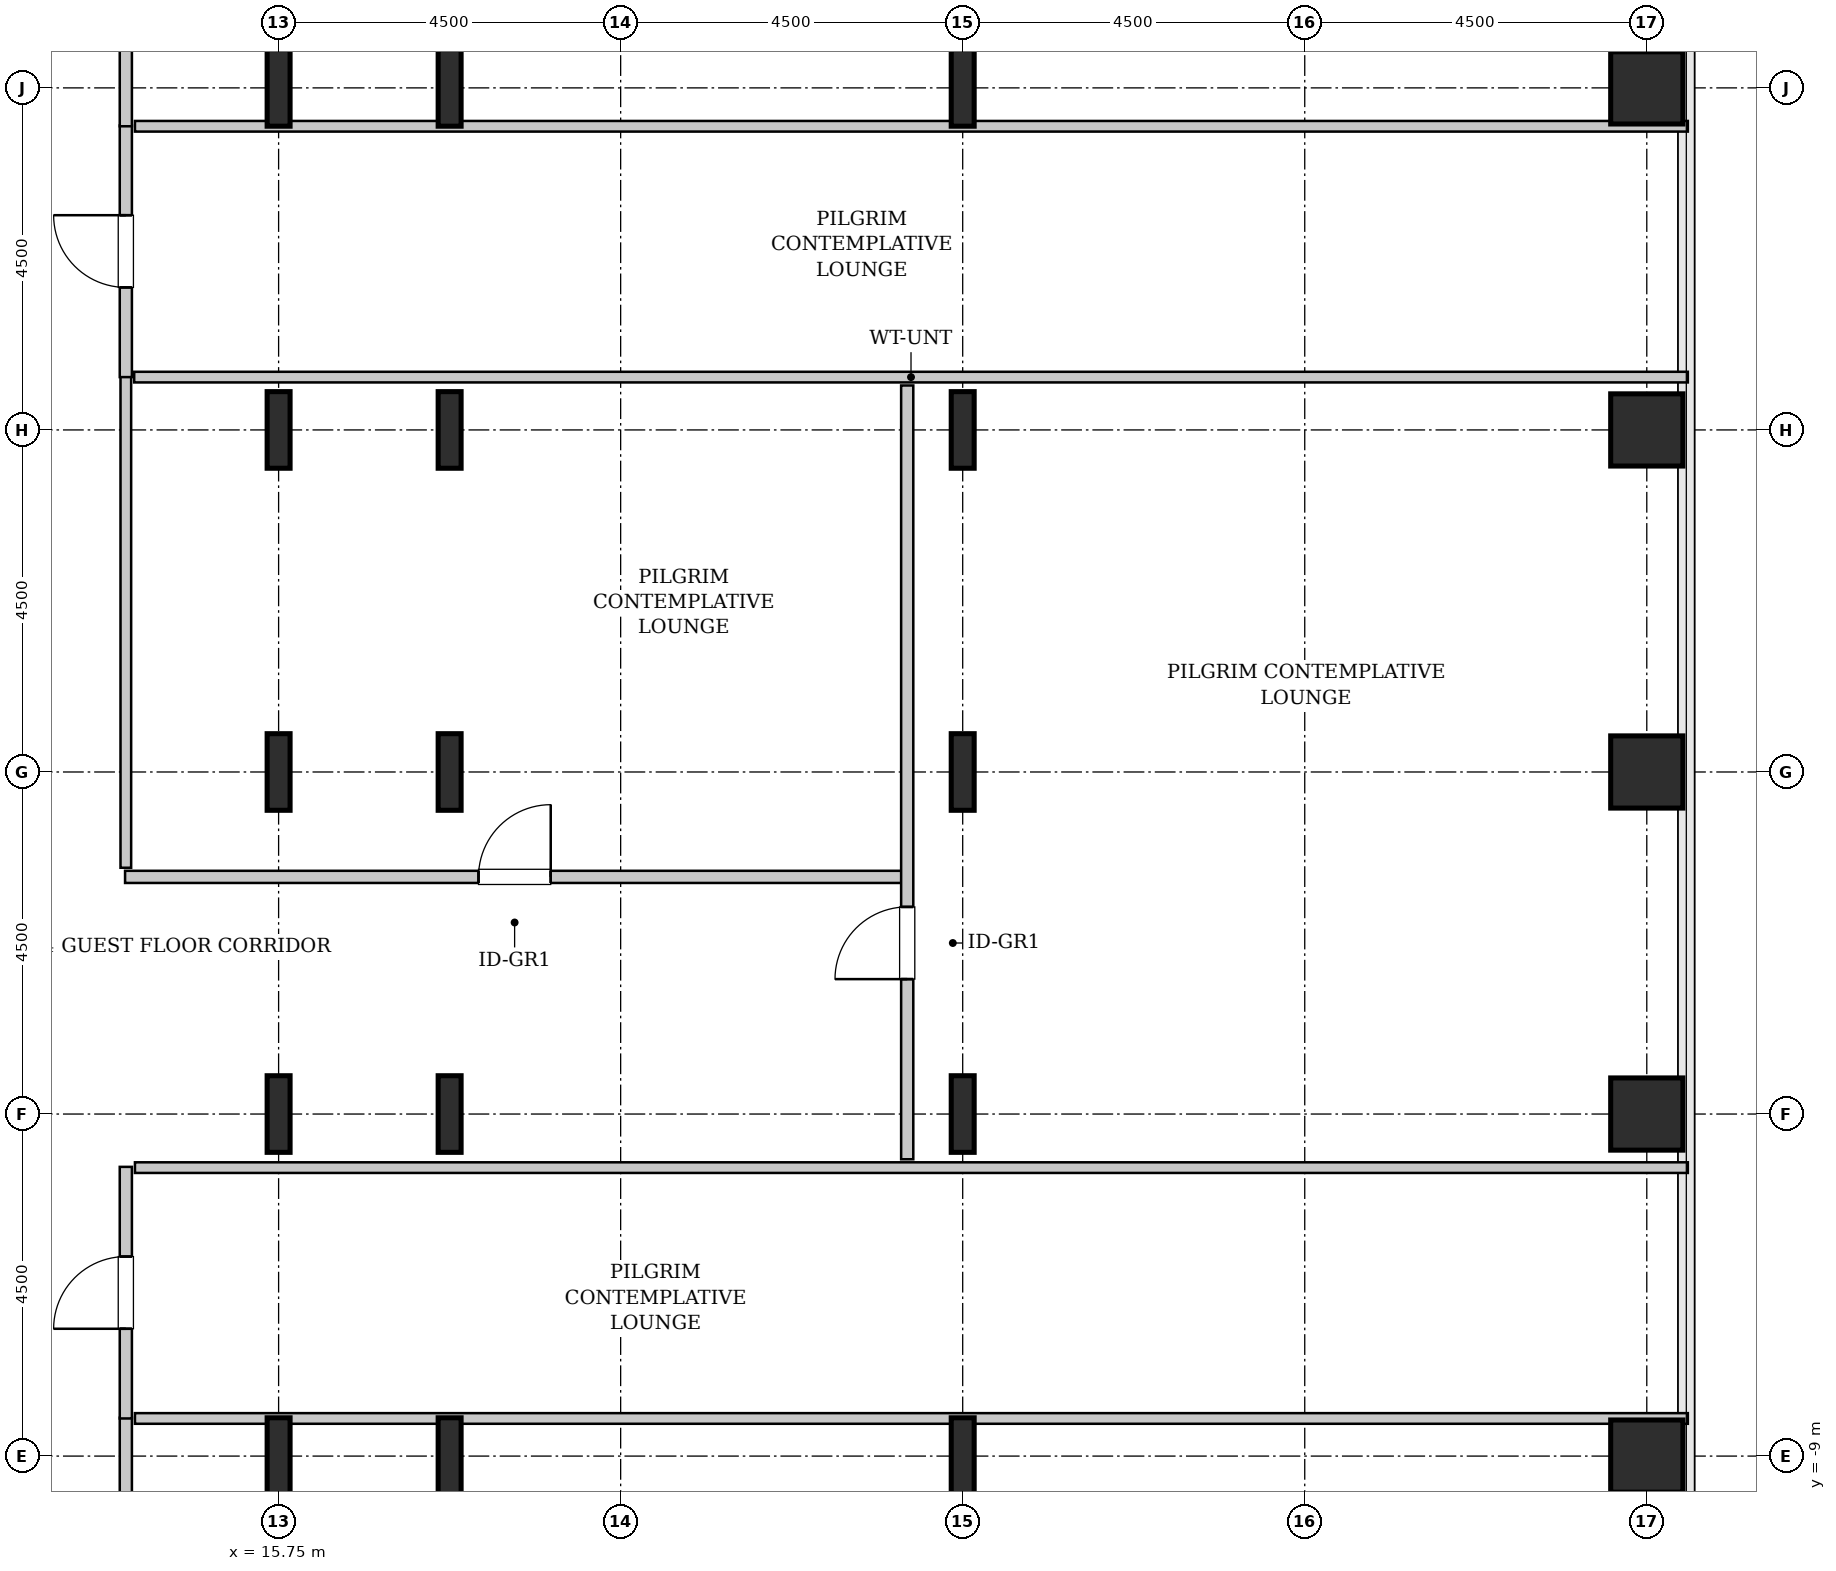
"""IFC4 building model, lengths in metres.
Left out: names, types, materials, properties, quantities, classifications, styles, units other than length and angle.
Written with IfcOpenShell. Run it as: python <this file> out.ifc"""

import sys

from ifc_helpers import new_model, si_unit, direction, frame, frame_2d, origin, origin_2d, place, context, subcontext, project, spatial, rectangle, hollow_rectangle, i_section, extrude, source, transform, mapped, element, fill, save


model = new_model("IFC4")
c1 = context("Model", 3, precision=1e-05, world=origin(), true_north=direction((0.0, 1.0)))
c2 = subcontext(c1, "Body", "Model", "MODEL_VIEW")
j1 = project(units=[si_unit("LENGTHUNIT", "METRE"), si_unit("PLANEANGLEUNIT", "RADIAN")], contexts=[c1])
p1 = place(None, origin())
s1 = spatial("IfcSite", under=j1, at=p1, CompositionType="ELEMENT")
p2 = place(p1, origin())
s2 = spatial("IfcBuilding", under=s1, at=p2, CompositionType="ELEMENT")
p3 = place(p2, frame((0.0, 0.0, 63.4)))
s3 = spatial("IfcBuildingStorey", under=s2, at=p3, CompositionType="ELEMENT", Elevation=63.4)
m1 = source(origin(), c2, "Body", "SweptSolid", [
    extrude(i_section(OverallWidth=0.302, OverallDepth=1.008, WebThickness=0.021, FlangeThickness=0.04, FilletRadius=0.03, at=origin_2d()), origin(), (0.0, 0.0, 1.0), 3.8),
])
for number, where, z_axis, x_axis in (
    (1, (15.75, -9.0, 0.0), (0.0, 0.0, 1.0), (1.0, 0.0, 0.0)),
    (2, (15.75, -4.5, 0.0), (0.0, 0.0, 1.0), (1.0, 0.0, 0.0)),
    (3, (15.75, 0.0, 0.0), (0.0, 0.0, 1.0), (1.0, 0.0, 0.0)),
    (4, (15.75, 4.5, 0.0), (0.0, 0.0, 1.0), (1.0, 0.0, 0.0)),
    (5, (15.75, 9.0, 0.0), (0.0, 0.0, 1.0), (1.0, 0.0, 0.0)),
    (6, (18.0, -9.0, 0.0), (0.0, 0.0, 1.0), (1.0, 0.0, 0.0)),
    (7, (18.0, -4.5, 0.0), (0.0, 0.0, 1.0), (1.0, 0.0, 0.0)),
    (8, (18.0, 0.0, 0.0), (0.0, 0.0, 1.0), (1.0, 0.0, 0.0)),
    (9, (18.0, 4.5, 0.0), (0.0, 0.0, 1.0), (1.0, 0.0, 0.0)),
    (10, (18.0, 9.0, 0.0), (0.0, 0.0, 1.0), (1.0, 0.0, 0.0)),
    (11, (24.75, -9.0, 0.0), (0.0, 0.0, 1.0), (1.0, 0.0, 0.0)),
    (12, (24.75, -4.5, 0.0), (0.0, 0.0, 1.0), (1.0, 0.0, 0.0)),
    (13, (24.75, 0.0, 0.0), (0.0, 0.0, 1.0), (1.0, 0.0, 0.0)),
    (14, (24.75, 4.5, 0.0), (0.0, 0.0, 1.0), (1.0, 0.0, 0.0)),
    (15, (24.75, 9.0, 0.0), (0.0, 0.0, 1.0), (1.0, 0.0, 0.0)),
):
    element("IfcColumn", number, at=place(p3, frame(where, z_axis=z_axis, x_axis=x_axis)), inside=s3, PredefinedType="COLUMN", context=c2, shape_type="MappedRepresentation", body=[
        mapped(m1, transform((0.0, 0.0, 0.0), x_axis=(1.0, 0.0, 0.0), y_axis=(0.0, 1.0, 0.0), z_axis=(0.0, 0.0, 1.0), scale=1.0)),
    ])
m2 = source(origin(), c2, "Body", "SweptSolid", [
    extrude(hollow_rectangle(XDim=0.95, YDim=0.95, WallThickness=0.045, InnerFilletRadius=0.045, OuterFilletRadius=0.09, at=origin_2d()), origin(), (0.0, 0.0, 1.0), 3.8),
])
for number, where, z_axis, x_axis in (
    (16, (33.75, -9.0, 0.0), (0.0, 0.0, 1.0), (1.0, 0.0, 0.0)),
    (17, (33.75, -4.5, 0.0), (0.0, 0.0, 1.0), (1.0, 0.0, 0.0)),
    (18, (33.75, 0.0, 0.0), (0.0, 0.0, 1.0), (1.0, 0.0, 0.0)),
    (19, (33.75, 4.5, 0.0), (0.0, 0.0, 1.0), (1.0, 0.0, 0.0)),
    (20, (33.75, 9.0, 0.0), (0.0, 0.0, 1.0), (1.0, 0.0, 0.0)),
):
    element("IfcColumn", number, at=place(p3, frame(where, z_axis=z_axis, x_axis=x_axis)), inside=s3, PredefinedType="COLUMN", context=c2, shape_type="MappedRepresentation", body=[
        mapped(m2, transform((0.0, 0.0, 0.0), x_axis=(1.0, 0.0, 0.0), y_axis=(0.0, 1.0, 0.0), z_axis=(0.0, 0.0, 1.0), scale=1.0)),
    ])
m3 = source(origin(), c2, "Body", "SweptSolid", [
    extrude(rectangle(XDim=14.545, YDim=0.16, at=frame_2d((7.272, 0.0))), origin(), (0.0, 0.0, 1.0), 3.535),
])
p4 = place(p3, frame((13.74, -23.04, 0.0), z_axis=(0.0, 0.0, 1.0), x_axis=(0.0, 1.0, 0.0)))
e21 = element("IfcWall", 21, at=p4, inside=s3, PredefinedType="PARTITIONING", context=c2, shape_type="MappedRepresentation", body=[
    mapped(m3, transform((0.0, 0.0, 0.0), x_axis=(1.0, 0.0, 0.0), y_axis=(0.0, 1.0, 0.0), z_axis=(0.0, 0.0, 1.0), scale=1.0)),
])
p5 = place(p4, frame((12.562, 0.0, 0.0)))
e22 = element("IfcOpeningElement", 22, at=p5, cuts=e21, PredefinedType="OPENING", context=c2, shape_type="SweptSolid", body=[
    extrude(rectangle(XDim=0.95, YDim=2.1, at=frame_2d((0.475, 1.05))), frame((0.0, 0.09, 0.0), z_axis=(0.0, -1.0, 0.0), x_axis=(1.0, 0.0, 0.0)), (0.0, 0.0, 1.0), 0.18),
])
m4 = source(origin(), c2, "Body", "SweptSolid", [
    extrude(rectangle(XDim=20.43, YDim=0.14, at=frame_2d((10.215, 0.0))), origin(), (0.0, 0.0, 1.0), 2.825),
])
p6 = place(p3, frame((13.86, -8.505, 0.0), z_axis=(0.0, 0.0, 1.0), x_axis=(1.0, 0.0, 0.0)))
e23 = element("IfcWall", 23, at=p6, inside=s3, PredefinedType="PARTITIONING", context=c2, shape_type="MappedRepresentation", body=[
    mapped(m4, transform((0.0, 0.0, 0.0), x_axis=(1.0, 0.0, 0.0), y_axis=(0.0, 1.0, 0.0), z_axis=(0.0, 0.0, 1.0), scale=1.0)),
])
m5 = source(origin(), c2, "Body", "SweptSolid", [
    extrude(rectangle(XDim=3.31, YDim=0.16, at=frame_2d((1.655, 0.0))), origin(), (0.0, 0.0, 1.0), 3.535),
])
p7 = place(p3, frame((13.74, -8.505, 0.0), z_axis=(0.0, 0.0, 1.0), x_axis=(0.0, 1.0, 0.0)))
e24 = element("IfcWall", 24, at=p7, inside=s3, PredefinedType="PARTITIONING", context=c2, shape_type="MappedRepresentation", body=[
    mapped(m5, transform((0.0, 0.0, 0.0), x_axis=(1.0, 0.0, 0.0), y_axis=(0.0, 1.0, 0.0), z_axis=(0.0, 0.0, 1.0), scale=1.0)),
])
p8 = place(p7, frame((1.18, 0.0, 0.0)))
e25 = element("IfcOpeningElement", 25, at=p8, cuts=e24, PredefinedType="OPENING", context=c2, shape_type="SweptSolid", body=[
    extrude(rectangle(XDim=0.95, YDim=2.1, at=frame_2d((0.475, 1.05))), frame((0.0, 0.09, 0.0), z_axis=(0.0, -1.0, 0.0), x_axis=(1.0, 0.0, 0.0)), (0.0, 0.0, 1.0), 0.18),
])
m6 = source(origin(), c2, "Body", "SweptSolid", [
    extrude(rectangle(XDim=20.43, YDim=0.14, at=frame_2d((10.215, 0.0))), origin(), (0.0, 0.0, 1.0), 3.535),
])
p9 = place(p3, frame((13.86, -5.205, 0.0), z_axis=(0.0, 0.0, 1.0), x_axis=(1.0, 0.0, 0.0)))
e26 = element("IfcWall", 26, at=p9, inside=s3, PredefinedType="PARTITIONING", context=c2, shape_type="MappedRepresentation", body=[
    mapped(m6, transform((0.0, 0.0, 0.0), x_axis=(1.0, 0.0, 0.0), y_axis=(0.0, 1.0, 0.0), z_axis=(0.0, 0.0, 1.0), scale=1.0)),
])
m7 = source(origin(), c2, "Body", "SweptSolid", [
    extrude(rectangle(XDim=10.25, YDim=0.16, at=frame_2d((5.125, 0.0))), origin(), (0.0, 0.0, 1.0), 3.535),
])
p10 = place(p3, frame((13.73, -1.38, 0.0), z_axis=(0.0, 0.0, 1.0), x_axis=(1.0, 0.0, 0.0)))
e27 = element("IfcWall", 27, at=p10, inside=s3, PredefinedType="PARTITIONING", context=c2, shape_type="MappedRepresentation", body=[
    mapped(m7, transform((0.0, 0.0, 0.0), x_axis=(1.0, 0.0, 0.0), y_axis=(0.0, 1.0, 0.0), z_axis=(0.0, 0.0, 1.0), scale=1.0)),
])
p11 = place(p10, frame((4.65, 0.0, 0.0)))
e28 = element("IfcOpeningElement", 28, at=p11, cuts=e27, PredefinedType="OPENING", context=c2, shape_type="SweptSolid", body=[
    extrude(rectangle(XDim=0.95, YDim=2.1, at=frame_2d((0.475, 1.05))), frame((0.0, 0.09, 0.0), z_axis=(0.0, -1.0, 0.0), x_axis=(1.0, 0.0, 0.0)), (0.0, 0.0, 1.0), 0.18),
])
m8 = source(origin(), c2, "Body", "SweptSolid", [
    extrude(rectangle(XDim=6.465, YDim=0.14, at=frame_2d((3.232, 0.0))), origin(), (0.0, 0.0, 1.0), 3.535),
])
p12 = place(p3, frame((13.74, -1.26, 0.0), z_axis=(0.0, 0.0, 1.0), x_axis=(0.0, 1.0, 0.0)))
e29 = element("IfcWall", 29, at=p12, inside=s3, PredefinedType="PARTITIONING", context=c2, shape_type="MappedRepresentation", body=[
    mapped(m8, transform((0.0, 0.0, 0.0), x_axis=(1.0, 0.0, 0.0), y_axis=(0.0, 1.0, 0.0), z_axis=(0.0, 0.0, 1.0), scale=1.0)),
])
m9 = source(origin(), c2, "Body", "SweptSolid", [
    extrude(rectangle(XDim=20.44, YDim=0.14, at=frame_2d((10.22, 0.0))), origin(), (0.0, 0.0, 1.0), 3.535),
])
p13 = place(p3, frame((13.85, 5.195, 0.0), z_axis=(0.0, 0.0, 1.0), x_axis=(1.0, 0.0, 0.0)))
e30 = element("IfcWall", 30, at=p13, inside=s3, PredefinedType="PARTITIONING", context=c2, shape_type="MappedRepresentation", body=[
    mapped(m9, transform((0.0, 0.0, 0.0), x_axis=(1.0, 0.0, 0.0), y_axis=(0.0, 1.0, 0.0), z_axis=(0.0, 0.0, 1.0), scale=1.0)),
])
m10 = source(origin(), c2, "Body", "SweptSolid", [
    extrude(rectangle(XDim=10.18, YDim=0.16, at=frame_2d((5.09, 0.0))), origin(), (0.0, 0.0, 1.0), 3.535),
])
p14 = place(p3, frame((24.02, -5.095, 0.0), z_axis=(0.0, 0.0, 1.0), x_axis=(0.0, 1.0, 0.0)))
e31 = element("IfcWall", 31, at=p14, inside=s3, PredefinedType="PARTITIONING", context=c2, shape_type="MappedRepresentation", body=[
    mapped(m10, transform((0.0, 0.0, 0.0), x_axis=(1.0, 0.0, 0.0), y_axis=(0.0, 1.0, 0.0), z_axis=(0.0, 0.0, 1.0), scale=1.0)),
])
p15 = place(p14, frame((2.37, 0.0, 0.0)))
e32 = element("IfcOpeningElement", 32, at=p15, cuts=e31, PredefinedType="OPENING", context=c2, shape_type="SweptSolid", body=[
    extrude(rectangle(XDim=0.95, YDim=2.1, at=frame_2d((0.475, 1.05))), frame((0.0, 0.09, 0.0), z_axis=(0.0, -1.0, 0.0), x_axis=(1.0, 0.0, 0.0)), (0.0, 0.0, 1.0), 0.18),
])
p16 = place(p3, frame((13.74, 5.195, 0.0), z_axis=(0.0, 0.0, 1.0), x_axis=(0.0, 1.0, 0.0)))
e33 = element("IfcWall", 33, at=p16, inside=s3, PredefinedType="PARTITIONING", context=c2, shape_type="MappedRepresentation", body=[
    mapped(m5, transform((0.0, 0.0, 0.0), x_axis=(1.0, 0.0, 0.0), y_axis=(0.0, 1.0, 0.0), z_axis=(0.0, 0.0, 1.0), scale=1.0)),
])
p17 = place(p16, frame((1.18, 0.0, 0.0)))
e34 = element("IfcOpeningElement", 34, at=p17, cuts=e33, PredefinedType="OPENING", context=c2, shape_type="SweptSolid", body=[
    extrude(rectangle(XDim=0.95, YDim=2.1, at=frame_2d((0.475, 1.05))), frame((0.0, 0.09, 0.0), z_axis=(0.0, -1.0, 0.0), x_axis=(1.0, 0.0, 0.0)), (0.0, 0.0, 1.0), 0.18),
])
p18 = place(p3, frame((13.86, 8.495, 0.0), z_axis=(0.0, 0.0, 1.0), x_axis=(1.0, 0.0, 0.0)))
e35 = element("IfcWall", 35, at=p18, inside=s3, PredefinedType="PARTITIONING", context=c2, shape_type="MappedRepresentation", body=[
    mapped(m4, transform((0.0, 0.0, 0.0), x_axis=(1.0, 0.0, 0.0), y_axis=(0.0, 1.0, 0.0), z_axis=(0.0, 0.0, 1.0), scale=1.0)),
])
p19 = place(p3, frame((13.74, 8.495, 0.0), z_axis=(0.0, 0.0, 1.0), x_axis=(0.0, 1.0, 0.0)))
e36 = element("IfcWall", 36, at=p19, inside=s3, PredefinedType="PARTITIONING", context=c2, shape_type="MappedRepresentation", body=[
    mapped(m3, transform((0.0, 0.0, 0.0), x_axis=(1.0, 0.0, 0.0), y_axis=(0.0, 1.0, 0.0), z_axis=(0.0, 0.0, 1.0), scale=1.0)),
])
p20 = place(p19, frame((1.032, 0.0, 0.0)))
e37 = element("IfcOpeningElement", 37, at=p20, cuts=e36, PredefinedType="OPENING", context=c2, shape_type="SweptSolid", body=[
    extrude(rectangle(XDim=0.95, YDim=2.1, at=frame_2d((0.475, 1.05))), frame((0.0, 0.09, 0.0), z_axis=(0.0, -1.0, 0.0), x_axis=(1.0, 0.0, 0.0)), (0.0, 0.0, 1.0), 0.18),
])
m11 = source(origin(), c2, "Body", "SweptSolid", [
    extrude(rectangle(XDim=0.95, YDim=2.1, at=frame_2d((0.475, 1.05))), frame((0.0, 0.025, 0.0), z_axis=(0.0, -1.0, 0.0), x_axis=(1.0, 0.0, 0.0)), (0.0, 0.0, 1.0), 0.05),
])
p21 = place(p8, origin())
e38 = element("IfcDoor", 38, at=p21, inside=s3, OperationType="SINGLE_SWING_LEFT", PredefinedType="DOOR", context=c2, shape_type="MappedRepresentation", body=[
    mapped(m11, transform((0.0, 0.0, 0.0), x_axis=(1.0, 0.0, 0.0), y_axis=(0.0, 1.0, 0.0), z_axis=(0.0, 0.0, 1.0), scale=1.0)),
])
fill(e25, e38)
p22 = place(p11, origin())
e39 = element("IfcDoor", 39, at=p22, inside=s3, OperationType="SINGLE_SWING_RIGHT", PredefinedType="DOOR", context=c2, shape_type="MappedRepresentation", body=[
    mapped(m11, transform((0.0, 0.0, 0.0), x_axis=(1.0, 0.0, 0.0), y_axis=(0.0, 1.0, 0.0), z_axis=(0.0, 0.0, 1.0), scale=1.0)),
])
fill(e28, e39)
p23 = place(p15, origin())
e40 = element("IfcDoor", 40, at=p23, inside=s3, OperationType="SINGLE_SWING_LEFT", PredefinedType="DOOR", context=c2, shape_type="MappedRepresentation", body=[
    mapped(m11, transform((0.0, 0.0, 0.0), x_axis=(1.0, 0.0, 0.0), y_axis=(0.0, 1.0, 0.0), z_axis=(0.0, 0.0, 1.0), scale=1.0)),
])
fill(e32, e40)
p24 = place(p17, origin())
e41 = element("IfcDoor", 41, at=p24, inside=s3, OperationType="SINGLE_SWING_RIGHT", PredefinedType="DOOR", context=c2, shape_type="MappedRepresentation", body=[
    mapped(m11, transform((0.0, 0.0, 0.0), x_axis=(1.0, 0.0, 0.0), y_axis=(0.0, 1.0, 0.0), z_axis=(0.0, 0.0, 1.0), scale=1.0)),
])
fill(e34, e41)
save(model, sys.argv[1])
